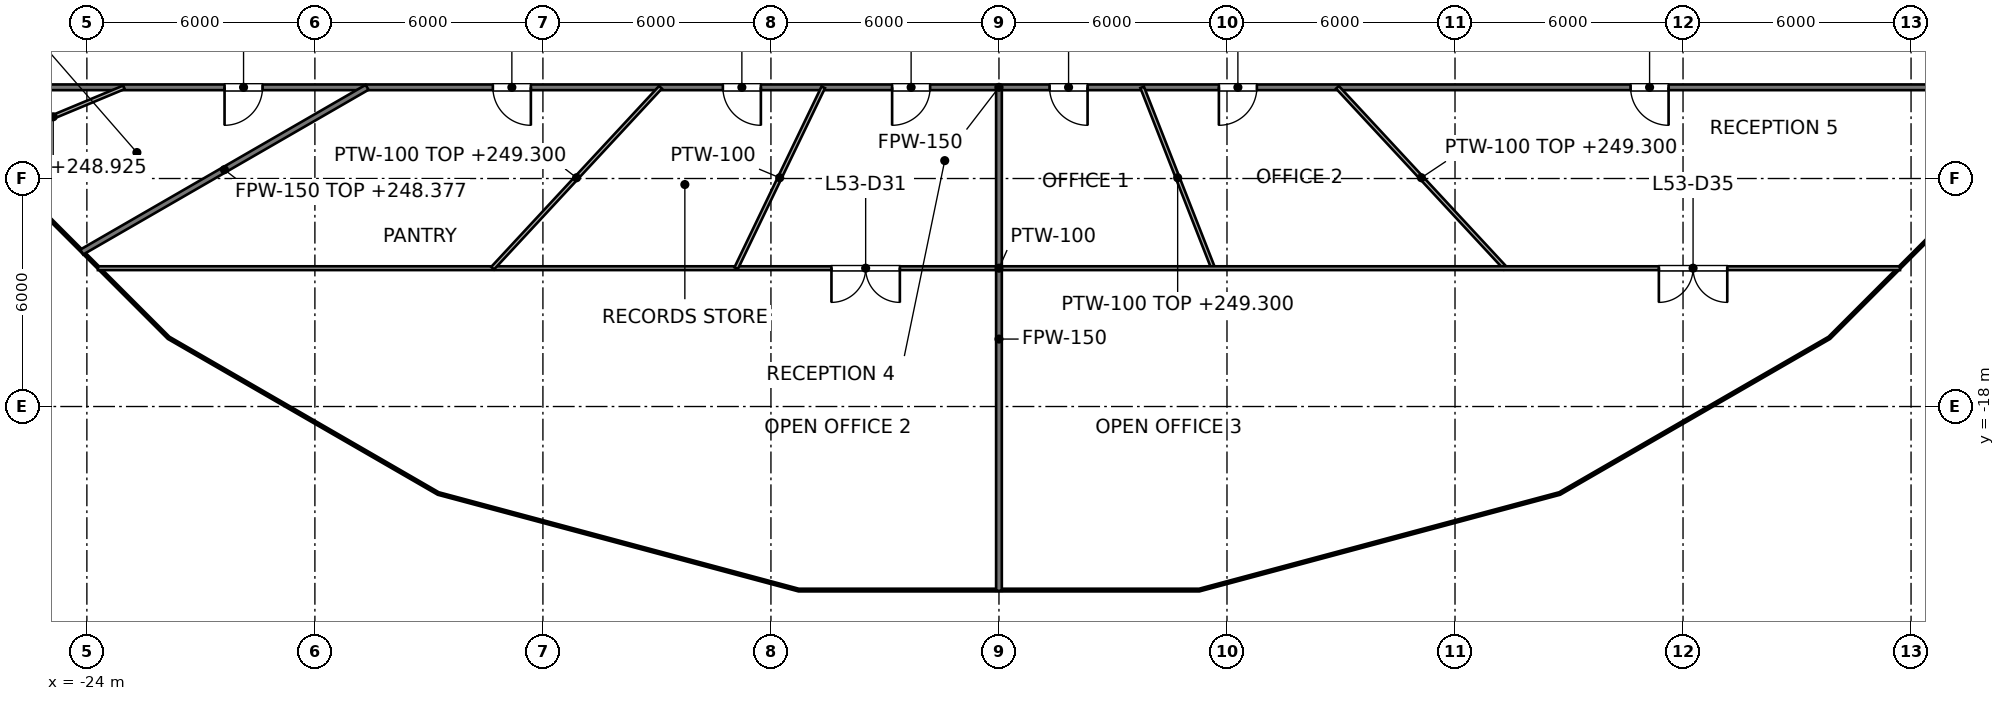
"""IFC4 building model, lengths in metres.
Left out: names, types, materials, properties, quantities, classifications, styles, units other than length and angle.
Written with IfcOpenShell. Run it as: python <this file> out.ifc"""

import sys

from ifc_helpers import new_model, si_unit, direction, frame, frame_2d, origin, place, context, subcontext, project, spatial, rectangle, extrude, element, fill, save


model = new_model("IFC4")
c1 = context("Model", 3, precision=1e-05, world=origin(), true_north=direction((0.0, 1.0)))
c2 = subcontext(c1, "Body", "Model", "MODEL_VIEW")
j1 = project(units=[si_unit("LENGTHUNIT", "METRE"), si_unit("PLANEANGLEUNIT", "RADIAN")], contexts=[c1])
p1 = place(None, origin())
s1 = spatial("IfcSite", under=j1, at=p1, CompositionType="ELEMENT")
p2 = place(p1, origin())
s2 = spatial("IfcBuilding", under=s1, at=p2, CompositionType="ELEMENT")
p3 = place(p2, frame((0.0, 0.0, 245.6)))
s3 = spatial("IfcBuildingStorey", under=s2, at=p3, CompositionType="ELEMENT", Elevation=245.6)
p4 = place(p3, frame((-25.333, -9.6, 0.0), z_axis=(0.0, 0.0, 1.0), x_axis=(1.0, 0.0, 0.0)))
e1 = element("IfcWall", 1, at=p4, inside=s3, PredefinedType="PARTITIONING", context=c2, shape_type="SweptSolid", body=[
    extrude(rectangle(XDim=50.666, YDim=0.15, at=frame_2d((25.333, 0.0))), origin(), (0.0, 0.0, 1.0), 2.768),
])
p5 = place(p4, frame((4.956, 0.0, 0.0)))
e2 = element("IfcOpeningElement", 2, at=p5, cuts=e1, PredefinedType="OPENING", context=c2, shape_type="SweptSolid", body=[
    extrude(rectangle(XDim=1.0, YDim=2.1, at=frame_2d((0.5, 1.05))), frame((0.0, 0.075, 0.0), z_axis=(0.0, -1.0, 0.0), x_axis=(1.0, 0.0, 0.0)), (0.0, 0.0, 1.0), 0.15),
])
p6 = place(p4, frame((12.016, 0.0, 0.0)))
e3 = element("IfcOpeningElement", 3, at=p6, cuts=e1, PredefinedType="OPENING", context=c2, shape_type="SweptSolid", body=[
    extrude(rectangle(XDim=1.0, YDim=2.1, at=frame_2d((0.5, 1.05))), frame((0.0, 0.075, 0.0), z_axis=(0.0, -1.0, 0.0), x_axis=(1.0, 0.0, 0.0)), (0.0, 0.0, 1.0), 0.15),
])
p7 = place(p4, frame((18.068, 0.0, 0.0)))
e4 = element("IfcOpeningElement", 4, at=p7, cuts=e1, PredefinedType="OPENING", context=c2, shape_type="SweptSolid", body=[
    extrude(rectangle(XDim=1.0, YDim=2.1, at=frame_2d((0.5, 1.05))), frame((0.0, 0.075, 0.0), z_axis=(0.0, -1.0, 0.0), x_axis=(1.0, 0.0, 0.0)), (0.0, 0.0, 1.0), 0.15),
])
p8 = place(p4, frame((22.521, 0.0, 0.0)))
e5 = element("IfcOpeningElement", 5, at=p8, cuts=e1, PredefinedType="OPENING", context=c2, shape_type="SweptSolid", body=[
    extrude(rectangle(XDim=1.0, YDim=2.1, at=frame_2d((0.5, 1.05))), frame((0.0, 0.075, 0.0), z_axis=(0.0, -1.0, 0.0), x_axis=(1.0, 0.0, 0.0)), (0.0, 0.0, 1.0), 0.15),
])
p9 = place(p4, frame((26.665, 0.0, 0.0)))
e6 = element("IfcOpeningElement", 6, at=p9, cuts=e1, PredefinedType="OPENING", context=c2, shape_type="SweptSolid", body=[
    extrude(rectangle(XDim=1.0, YDim=2.1, at=frame_2d((0.5, 1.05))), frame((0.0, 0.075, 0.0), z_axis=(0.0, -1.0, 0.0), x_axis=(1.0, 0.0, 0.0)), (0.0, 0.0, 1.0), 0.15),
])
p10 = place(p4, frame((31.12, 0.0, 0.0)))
e7 = element("IfcOpeningElement", 7, at=p10, cuts=e1, PredefinedType="OPENING", context=c2, shape_type="SweptSolid", body=[
    extrude(rectangle(XDim=1.0, YDim=2.1, at=frame_2d((0.5, 1.05))), frame((0.0, 0.075, 0.0), z_axis=(0.0, -1.0, 0.0), x_axis=(1.0, 0.0, 0.0)), (0.0, 0.0, 1.0), 0.15),
])
p11 = place(p4, frame((41.953, 0.0, 0.0)))
e8 = element("IfcOpeningElement", 8, at=p11, cuts=e1, PredefinedType="OPENING", context=c2, shape_type="SweptSolid", body=[
    extrude(rectangle(XDim=1.0, YDim=2.1, at=frame_2d((0.5, 1.05))), frame((0.0, 0.075, 0.0), z_axis=(0.0, -1.0, 0.0), x_axis=(1.0, 0.0, 0.0)), (0.0, 0.0, 1.0), 0.15),
])
p12 = place(p3, frame((-24.135, -13.935, 0.0), z_axis=(0.0, 0.0, 1.0), x_axis=(0.866016292776, 0.500015780397, 0.0)))
e9 = element("IfcWall", 9, at=p12, inside=s3, PredefinedType="PARTITIONING", context=c2, shape_type="SweptSolid", body=[
    extrude(rectangle(XDim=8.67, YDim=0.15, at=frame_2d((4.335, 0.0))), origin(), (0.0, 0.0, 1.0), 2.777),
])
p13 = place(p3, frame((0.0, -22.85, 0.0), z_axis=(0.0, 0.0, 1.0), x_axis=(0.0, 1.0, 0.0)))
e10 = element("IfcWall", 10, at=p13, inside=s3, PredefinedType="PARTITIONING", context=c2, shape_type="SweptSolid", body=[
    extrude(rectangle(XDim=13.25, YDim=0.15, at=frame_2d((6.625, 0.0))), origin(), (0.0, 0.0, 1.0), 2.768),
])
p14 = place(p3, frame((3.768, -9.6, 0.0), z_axis=(0.0, 0.0, 1.0), x_axis=(0.365299294679, -0.93089012526, 0.0)))
e11 = element("IfcWall", 11, at=p14, inside=s3, PredefinedType="PARTITIONING", context=c2, shape_type="SweptSolid", body=[
    extrude(rectangle(XDim=5.113, YDim=0.1, at=frame_2d((2.557, 0.0))), origin(), (0.0, 0.0, 1.0), 3.7),
])
p15 = place(p3, frame((8.907, -9.6, 0.0), z_axis=(0.0, 0.0, 1.0), x_axis=(0.680201581888, -0.733025107344, 0.0)))
e12 = element("IfcWall", 12, at=p15, inside=s3, PredefinedType="PARTITIONING", context=c2, shape_type="SweptSolid", body=[
    extrude(rectangle(XDim=6.494, YDim=0.1, at=frame_2d((3.247, 0.0))), origin(), (0.0, 0.0, 1.0), 3.7),
])
p16 = place(p3, frame((-23.71, -14.36, 0.0), z_axis=(0.0, 0.0, 1.0), x_axis=(1.0, 0.0, 0.0)))
e13 = element("IfcWall", 13, at=p16, inside=s3, PredefinedType="PARTITIONING", context=c2, shape_type="SweptSolid", body=[
    extrude(rectangle(XDim=47.42, YDim=0.1, at=frame_2d((23.71, 0.0))), origin(), (0.0, 0.0, 1.0), 2.768),
])
p17 = place(p16, frame((19.302, 0.0, 0.0)))
e14 = element("IfcOpeningElement", 14, at=p17, cuts=e13, PredefinedType="OPENING", context=c2, shape_type="SweptSolid", body=[
    extrude(rectangle(XDim=1.8, YDim=2.1, at=frame_2d((0.9, 1.05))), frame((0.0, 0.05, 0.0), z_axis=(0.0, -1.0, 0.0), x_axis=(1.0, 0.0, 0.0)), (0.0, 0.0, 1.0), 0.1),
])
p18 = place(p16, frame((41.074, 0.0, 0.0)))
e15 = element("IfcOpeningElement", 15, at=p18, cuts=e13, PredefinedType="OPENING", context=c2, shape_type="SweptSolid", body=[
    extrude(rectangle(XDim=1.8, YDim=2.1, at=frame_2d((0.9, 1.05))), frame((0.0, 0.05, 0.0), z_axis=(0.0, -1.0, 0.0), x_axis=(1.0, 0.0, 0.0)), (0.0, 0.0, 1.0), 0.1),
])
p19 = place(p3, frame((-26.747, -11.152, 0.0), z_axis=(0.0, 0.0, 1.0), x_axis=(0.922980174508, 0.384847498973, 0.0)))
e16 = element("IfcWall", 16, at=p19, inside=s3, PredefinedType="PARTITIONING", context=c2, shape_type="SweptSolid", body=[
    extrude(rectangle(XDim=4.033, YDim=0.1, at=frame_2d((2.016, 0.0))), origin(), (0.0, 0.0, 1.0), 3.325),
])
p20 = place(p3, frame((-13.324, -14.36, 0.0), z_axis=(0.0, 0.0, 1.0), x_axis=(0.680201581888, 0.733025107344, 0.0)))
e17 = element("IfcWall", 17, at=p20, inside=s3, PredefinedType="PARTITIONING", context=c2, shape_type="SweptSolid", body=[
    extrude(rectangle(XDim=6.494, YDim=0.1, at=frame_2d((3.247, 0.0))), origin(), (0.0, 0.0, 1.0), 3.7),
])
p21 = place(p3, frame((-6.915, -14.36, 0.0), z_axis=(0.0, 0.0, 1.0), x_axis=(0.433836460285, 0.90099163466, 0.0)))
e18 = element("IfcWall", 18, at=p21, inside=s3, PredefinedType="PARTITIONING", context=c2, shape_type="SweptSolid", body=[
    extrude(rectangle(XDim=5.283, YDim=0.1, at=frame_2d((2.642, 0.0))), origin(), (0.0, 0.0, 1.0), 2.768),
])
p22 = place(p5, origin())
e19 = element("IfcDoor", 19, at=p22, inside=s3, OperationType="SINGLE_SWING_LEFT", PredefinedType="DOOR", context=c2, shape_type="SweptSolid", body=[
    extrude(rectangle(XDim=1.0, YDim=2.1, at=frame_2d((0.5, 1.05))), frame((0.0, 0.025, 0.0), z_axis=(0.0, -1.0, 0.0), x_axis=(1.0, 0.0, 0.0)), (0.0, 0.0, 1.0), 0.05),
])
fill(e2, e19)
p23 = place(p6, origin())
e20 = element("IfcDoor", 20, at=p23, inside=s3, OperationType="SINGLE_SWING_RIGHT", PredefinedType="DOOR", context=c2, shape_type="SweptSolid", body=[
    extrude(rectangle(XDim=1.0, YDim=2.1, at=frame_2d((0.5, 1.05))), frame((0.0, 0.025, 0.0), z_axis=(0.0, -1.0, 0.0), x_axis=(1.0, 0.0, 0.0)), (0.0, 0.0, 1.0), 0.05),
])
fill(e3, e20)
p24 = place(p7, origin())
e21 = element("IfcDoor", 21, at=p24, inside=s3, OperationType="SINGLE_SWING_RIGHT", PredefinedType="DOOR", context=c2, shape_type="SweptSolid", body=[
    extrude(rectangle(XDim=1.0, YDim=2.1, at=frame_2d((0.5, 1.05))), frame((0.0, 0.025, 0.0), z_axis=(0.0, -1.0, 0.0), x_axis=(1.0, 0.0, 0.0)), (0.0, 0.0, 1.0), 0.05),
])
fill(e4, e21)
p25 = place(p8, origin())
e22 = element("IfcDoor", 22, at=p25, inside=s3, OperationType="SINGLE_SWING_LEFT", PredefinedType="DOOR", context=c2, shape_type="SweptSolid", body=[
    extrude(rectangle(XDim=1.0, YDim=2.1, at=frame_2d((0.5, 1.05))), frame((0.0, 0.025, 0.0), z_axis=(0.0, -1.0, 0.0), x_axis=(1.0, 0.0, 0.0)), (0.0, 0.0, 1.0), 0.05),
])
fill(e5, e22)
p26 = place(p17, origin())
e23 = element("IfcDoor", 23, at=p26, inside=s3, OperationType="DOUBLE_DOOR_SINGLE_SWING", PredefinedType="DOOR", context=c2, shape_type="SweptSolid", body=[
    extrude(rectangle(XDim=1.8, YDim=2.1, at=frame_2d((0.9, 1.05))), frame((0.0, 0.025, 0.0), z_axis=(0.0, -1.0, 0.0), x_axis=(1.0, 0.0, 0.0)), (0.0, 0.0, 1.0), 0.05),
])
fill(e14, e23)
p27 = place(p9, origin())
e24 = element("IfcDoor", 24, at=p27, inside=s3, OperationType="SINGLE_SWING_RIGHT", PredefinedType="DOOR", context=c2, shape_type="SweptSolid", body=[
    extrude(rectangle(XDim=1.0, YDim=2.1, at=frame_2d((0.5, 1.05))), frame((0.0, 0.025, 0.0), z_axis=(0.0, -1.0, 0.0), x_axis=(1.0, 0.0, 0.0)), (0.0, 0.0, 1.0), 0.05),
])
fill(e6, e24)
p28 = place(p10, origin())
e25 = element("IfcDoor", 25, at=p28, inside=s3, OperationType="SINGLE_SWING_LEFT", PredefinedType="DOOR", context=c2, shape_type="SweptSolid", body=[
    extrude(rectangle(XDim=1.0, YDim=2.1, at=frame_2d((0.5, 1.05))), frame((0.0, 0.025, 0.0), z_axis=(0.0, -1.0, 0.0), x_axis=(1.0, 0.0, 0.0)), (0.0, 0.0, 1.0), 0.05),
])
fill(e7, e25)
p29 = place(p11, origin())
e26 = element("IfcDoor", 26, at=p29, inside=s3, OperationType="SINGLE_SWING_RIGHT", PredefinedType="DOOR", context=c2, shape_type="SweptSolid", body=[
    extrude(rectangle(XDim=1.0, YDim=2.1, at=frame_2d((0.5, 1.05))), frame((0.0, 0.025, 0.0), z_axis=(0.0, -1.0, 0.0), x_axis=(1.0, 0.0, 0.0)), (0.0, 0.0, 1.0), 0.05),
])
fill(e8, e26)
p30 = place(p18, origin())
e27 = element("IfcDoor", 27, at=p30, inside=s3, OperationType="DOUBLE_DOOR_SINGLE_SWING", PredefinedType="DOOR", context=c2, shape_type="SweptSolid", body=[
    extrude(rectangle(XDim=1.8, YDim=2.1, at=frame_2d((0.9, 1.05))), frame((0.0, 0.025, 0.0), z_axis=(0.0, -1.0, 0.0), x_axis=(1.0, 0.0, 0.0)), (0.0, 0.0, 1.0), 0.05),
])
fill(e15, e27)
save(model, sys.argv[1])
